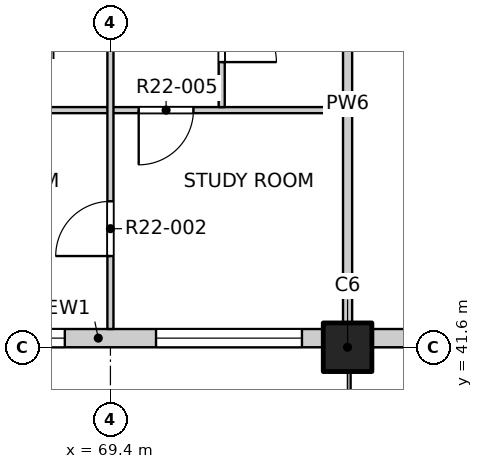
"""IFC4 building model, lengths in metres.
Left out: names, types, materials, properties, quantities, classifications, styles, units other than length and angle.
Written with IfcOpenShell. Run it as: python <this file> out.ifc"""

import sys

from ifc_helpers import new_model, si_unit, direction, frame, frame_2d, origin, origin_2d, place, context, subcontext, project, spatial, rectangle, extrude, element, fill, save


model = new_model("IFC4")
c1 = context("Model", 3, precision=1e-05, world=origin(), true_north=direction((0.0, 1.0)))
c2 = subcontext(c1, "Body", "Model", "MODEL_VIEW")
j1 = project(units=[si_unit("LENGTHUNIT", "METRE"), si_unit("PLANEANGLEUNIT", "RADIAN")], contexts=[c1])
p1 = place(None, origin())
s1 = spatial("IfcSite", under=j1, at=p1, CompositionType="ELEMENT")
p2 = place(p1, origin())
s2 = spatial("IfcBuilding", under=s1, at=p2, CompositionType="ELEMENT")
p3 = place(p2, frame((0.0, 0.0, 224.5)))
s3 = spatial("IfcBuildingStorey", under=s2, at=p3, CompositionType="ELEMENT", Elevation=224.5)
p4 = place(p3, frame((73.3, 41.6, -0.25), z_axis=(0.0, 0.0, 1.0), x_axis=(1.0, 0.0, 0.0)))
e1 = element("IfcColumn", 1, at=p4, inside=s3, PredefinedType="COLUMN", context=c2, shape_type="SweptSolid", body=[
    extrude(rectangle(XDim=0.8, YDim=0.8, at=origin_2d()), origin(), (0.0, 0.0, 1.0), 3.4),
])
p5 = place(p3, frame((65.5, 41.75, 0.0), z_axis=(0.0, 0.0, 1.0), x_axis=(1.0, 0.0, 0.0)))
e2 = element("IfcWall", 2, at=p5, inside=s3, PredefinedType="SOLIDWALL", context=c2, shape_type="SweptSolid", body=[
    extrude(rectangle(XDim=7.4, YDim=0.3, at=frame_2d((3.7, 0.0))), origin(), (0.0, 0.0, 1.0), 2.7),
])
p6 = place(p5, frame((0.75, 0.0, 0.9)))
e3 = element("IfcOpeningElement", 3, at=p6, cuts=e2, PredefinedType="OPENING", context=c2, shape_type="SweptSolid", body=[
    extrude(rectangle(XDim=2.4, YDim=1.8, at=frame_2d((1.2, 0.9))), frame((0.0, 0.16, 0.0), z_axis=(0.0, -1.0, 0.0), x_axis=(1.0, 0.0, 0.0)), (0.0, 0.0, 1.0), 0.32),
])
p7 = place(p5, frame((4.65, 0.0, 0.9)))
e4 = element("IfcOpeningElement", 4, at=p7, cuts=e2, PredefinedType="OPENING", context=c2, shape_type="SweptSolid", body=[
    extrude(rectangle(XDim=2.4, YDim=1.8, at=frame_2d((1.2, 0.9))), frame((0.0, 0.16, 0.0), z_axis=(0.0, -1.0, 0.0), x_axis=(1.0, 0.0, 0.0)), (0.0, 0.0, 1.0), 0.32),
])
p8 = place(p3, frame((73.7, 41.75, 0.0), z_axis=(0.0, 0.0, 1.0), x_axis=(1.0, 0.0, 0.0)))
e5 = element("IfcWall", 5, at=p8, inside=s3, PredefinedType="SOLIDWALL", context=c2, shape_type="SweptSolid", body=[
    extrude(rectangle(XDim=7.0, YDim=0.3, at=frame_2d((3.5, 0.0))), origin(), (0.0, 0.0, 1.0), 2.7),
])
p9 = place(p8, frame((0.65, 0.0, 0.0)))
e6 = element("IfcOpeningElement", 6, at=p9, cuts=e5, PredefinedType="OPENING", context=c2, shape_type="SweptSolid", body=[
    extrude(rectangle(XDim=1.8, YDim=2.4, at=frame_2d((0.9, 1.2))), frame((0.0, 0.16, 0.0), z_axis=(0.0, -1.0, 0.0), x_axis=(1.0, 0.0, 0.0)), (0.0, 0.0, 1.0), 0.32),
])
p10 = place(p8, frame((4.25, 0.0, 0.9)))
e7 = element("IfcOpeningElement", 7, at=p10, cuts=e5, PredefinedType="OPENING", context=c2, shape_type="SweptSolid", body=[
    extrude(rectangle(XDim=2.4, YDim=1.8, at=frame_2d((1.2, 0.9))), frame((0.0, 0.16, 0.0), z_axis=(0.0, -1.0, 0.0), x_axis=(1.0, 0.0, 0.0)), (0.0, 0.0, 1.0), 0.32),
])
p11 = place(p3, frame((61.9, 45.5, 0.0), z_axis=(0.0, 0.0, 1.0), x_axis=(1.0, 0.0, 0.0)))
e8 = element("IfcWall", 8, at=p11, inside=s3, PredefinedType="PARTITIONING", context=c2, shape_type="SweptSolid", body=[
    extrude(rectangle(XDim=11.475, YDim=0.1, at=frame_2d((5.737, 0.0))), origin(), (0.0, 0.0, 1.0), 3.15),
])
p12 = place(p11, frame((7.965, 0.0, 0.0)))
e9 = element("IfcOpeningElement", 9, at=p12, cuts=e8, PredefinedType="OPENING", context=c2, shape_type="SweptSolid", body=[
    extrude(rectangle(XDim=0.9, YDim=2.1, at=frame_2d((0.45, 1.05))), frame((0.0, 0.06, 0.0), z_axis=(0.0, -1.0, 0.0), x_axis=(1.0, 0.0, 0.0)), (0.0, 0.0, 1.0), 0.12),
])
p13 = place(p3, frame((69.4, 41.9, 0.0), z_axis=(0.0, 0.0, 1.0), x_axis=(0.0, 1.0, 0.0)))
e10 = element("IfcWall", 10, at=p13, inside=s3, PredefinedType="PARTITIONING", context=c2, shape_type="SweptSolid", body=[
    extrude(rectangle(XDim=46.2, YDim=0.1, at=frame_2d((23.1, 0.0))), origin(), (0.0, 0.0, 1.0), 3.15),
])
p14 = place(p13, frame((1.2, 0.0, 0.0)))
e11 = element("IfcOpeningElement", 11, at=p14, cuts=e10, PredefinedType="OPENING", context=c2, shape_type="SweptSolid", body=[
    extrude(rectangle(XDim=0.9, YDim=2.1, at=frame_2d((0.45, 1.05))), frame((0.0, 0.06, 0.0), z_axis=(0.0, -1.0, 0.0), x_axis=(1.0, 0.0, 0.0)), (0.0, 0.0, 1.0), 0.12),
])
p15 = place(p13, frame((5.1, 0.0, 0.0)))
e12 = element("IfcOpeningElement", 12, at=p15, cuts=e10, PredefinedType="OPENING", context=c2, shape_type="SweptSolid", body=[
    extrude(rectangle(XDim=0.9, YDim=2.1, at=frame_2d((0.45, 1.05))), frame((0.0, 0.06, 0.0), z_axis=(0.0, -1.0, 0.0), x_axis=(1.0, 0.0, 0.0)), (0.0, 0.0, 1.0), 0.12),
])
p16 = place(p13, frame((9.0, 0.0, 0.0)))
e13 = element("IfcOpeningElement", 13, at=p16, cuts=e10, PredefinedType="OPENING", context=c2, shape_type="SweptSolid", body=[
    extrude(rectangle(XDim=0.9, YDim=2.1, at=frame_2d((0.45, 1.05))), frame((0.0, 0.06, 0.0), z_axis=(0.0, -1.0, 0.0), x_axis=(1.0, 0.0, 0.0)), (0.0, 0.0, 1.0), 0.12),
])
p17 = place(p13, frame((13.85, 0.0, 0.0)))
e14 = element("IfcOpeningElement", 14, at=p17, cuts=e10, PredefinedType="OPENING", context=c2, shape_type="SweptSolid", body=[
    extrude(rectangle(XDim=0.9, YDim=2.1, at=frame_2d((0.45, 1.05))), frame((0.0, 0.06, 0.0), z_axis=(0.0, -1.0, 0.0), x_axis=(1.0, 0.0, 0.0)), (0.0, 0.0, 1.0), 0.12),
])
p18 = place(p13, frame((17.775, 0.0, 0.0)))
e15 = element("IfcOpeningElement", 15, at=p18, cuts=e10, PredefinedType="OPENING", context=c2, shape_type="SweptSolid", body=[
    extrude(rectangle(XDim=0.9, YDim=2.1, at=frame_2d((0.45, 1.05))), frame((0.0, 0.06, 0.0), z_axis=(0.0, -1.0, 0.0), x_axis=(1.0, 0.0, 0.0)), (0.0, 0.0, 1.0), 0.12),
])
p19 = place(p13, frame((21.625, 0.0, 0.0)))
e16 = element("IfcOpeningElement", 16, at=p19, cuts=e10, PredefinedType="OPENING", context=c2, shape_type="SweptSolid", body=[
    extrude(rectangle(XDim=0.9, YDim=2.1, at=frame_2d((0.45, 1.05))), frame((0.0, 0.06, 0.0), z_axis=(0.0, -1.0, 0.0), x_axis=(1.0, 0.0, 0.0)), (0.0, 0.0, 1.0), 0.12),
])
p20 = place(p13, frame((24.6, 0.0, 0.0)))
e17 = element("IfcOpeningElement", 17, at=p20, cuts=e10, PredefinedType="OPENING", context=c2, shape_type="SweptSolid", body=[
    extrude(rectangle(XDim=0.9, YDim=2.1, at=frame_2d((0.45, 1.05))), frame((0.0, 0.06, 0.0), z_axis=(0.0, -1.0, 0.0), x_axis=(1.0, 0.0, 0.0)), (0.0, 0.0, 1.0), 0.12),
])
p21 = place(p13, frame((29.425, 0.0, 0.0)))
e18 = element("IfcOpeningElement", 18, at=p21, cuts=e10, PredefinedType="OPENING", context=c2, shape_type="SweptSolid", body=[
    extrude(rectangle(XDim=0.9, YDim=2.1, at=frame_2d((0.45, 1.05))), frame((0.0, 0.06, 0.0), z_axis=(0.0, -1.0, 0.0), x_axis=(1.0, 0.0, 0.0)), (0.0, 0.0, 1.0), 0.12),
])
p22 = place(p13, frame((33.375, 0.0, 0.0)))
e19 = element("IfcOpeningElement", 19, at=p22, cuts=e10, PredefinedType="OPENING", context=c2, shape_type="SweptSolid", body=[
    extrude(rectangle(XDim=0.9, YDim=2.1, at=frame_2d((0.45, 1.05))), frame((0.0, 0.06, 0.0), z_axis=(0.0, -1.0, 0.0), x_axis=(1.0, 0.0, 0.0)), (0.0, 0.0, 1.0), 0.12),
])
p23 = place(p13, frame((36.3, 0.0, 0.0)))
e20 = element("IfcOpeningElement", 20, at=p23, cuts=e10, PredefinedType="OPENING", context=c2, shape_type="SweptSolid", body=[
    extrude(rectangle(XDim=0.9, YDim=2.1, at=frame_2d((0.45, 1.05))), frame((0.0, 0.06, 0.0), z_axis=(0.0, -1.0, 0.0), x_axis=(1.0, 0.0, 0.0)), (0.0, 0.0, 1.0), 0.12),
])
p24 = place(p13, frame((41.175, 0.0, 0.0)))
e21 = element("IfcOpeningElement", 21, at=p24, cuts=e10, PredefinedType="OPENING", context=c2, shape_type="SweptSolid", body=[
    extrude(rectangle(XDim=0.9, YDim=2.1, at=frame_2d((0.45, 1.05))), frame((0.0, 0.06, 0.0), z_axis=(0.0, -1.0, 0.0), x_axis=(1.0, 0.0, 0.0)), (0.0, 0.0, 1.0), 0.12),
])
p25 = place(p13, frame((44.1, 0.0, 0.0)))
e22 = element("IfcOpeningElement", 22, at=p25, cuts=e10, PredefinedType="OPENING", context=c2, shape_type="SweptSolid", body=[
    extrude(rectangle(XDim=0.9, YDim=2.1, at=frame_2d((0.45, 1.05))), frame((0.0, 0.06, 0.0), z_axis=(0.0, -1.0, 0.0), x_axis=(1.0, 0.0, 0.0)), (0.0, 0.0, 1.0), 0.12),
])
p26 = place(p3, frame((71.23, 45.55, 0.0), z_axis=(0.0, 0.0, 1.0), x_axis=(0.0, 1.0, 0.0)))
e23 = element("IfcWall", 23, at=p26, inside=s3, PredefinedType="PARTITIONING", context=c2, shape_type="SweptSolid", body=[
    extrude(rectangle(XDim=8.65, YDim=0.1, at=frame_2d((4.325, 0.0))), origin(), (0.0, 0.0, 1.0), 3.15),
])
p27 = place(p26, frame((0.74, 0.0, 0.0)))
e24 = element("IfcOpeningElement", 24, at=p27, cuts=e23, PredefinedType="OPENING", context=c2, shape_type="SweptSolid", body=[
    extrude(rectangle(XDim=0.9, YDim=2.1, at=frame_2d((0.45, 1.05))), frame((0.0, 0.06, 0.0), z_axis=(0.0, -1.0, 0.0), x_axis=(1.0, 0.0, 0.0)), (0.0, 0.0, 1.0), 0.12),
])
p28 = place(p26, frame((3.48, 0.0, 0.0)))
e25 = element("IfcOpeningElement", 25, at=p28, cuts=e23, PredefinedType="OPENING", context=c2, shape_type="SweptSolid", body=[
    extrude(rectangle(XDim=0.8, YDim=2.1, at=frame_2d((0.4, 1.05))), frame((0.0, 0.06, 0.0), z_axis=(0.0, -1.0, 0.0), x_axis=(1.0, 0.0, 0.0)), (0.0, 0.0, 1.0), 0.12),
])
p29 = place(p26, frame((6.565, 0.0, 0.0)))
e26 = element("IfcOpeningElement", 26, at=p29, cuts=e23, PredefinedType="OPENING", context=c2, shape_type="SweptSolid", body=[
    extrude(rectangle(XDim=0.9, YDim=2.1, at=frame_2d((0.45, 1.05))), frame((0.0, 0.06, 0.0), z_axis=(0.0, -1.0, 0.0), x_axis=(1.0, 0.0, 0.0)), (0.0, 0.0, 1.0), 0.12),
])
p30 = place(p3, frame((73.3, 41.9, 0.0), z_axis=(0.0, 0.0, 1.0), x_axis=(0.0, 1.0, 0.0)))
e27 = element("IfcWall", 27, at=p30, inside=s3, PredefinedType="PARTITIONING", context=c2, shape_type="SweptSolid", body=[
    extrude(rectangle(XDim=7.4, YDim=0.15, at=frame_2d((3.7, 0.0))), origin(), (0.0, 0.0, 1.0), 3.15),
])
p31 = place(p6, origin())
e28 = element("IfcWindow", 28, at=p31, inside=s3, PartitioningType="DOUBLE_PANEL_VERTICAL", PredefinedType="WINDOW", context=c2, shape_type="SweptSolid", body=[
    extrude(rectangle(XDim=2.4, YDim=1.8, at=frame_2d((1.2, 0.9))), frame((0.0, 0.03, 0.0), z_axis=(0.0, -1.0, 0.0), x_axis=(1.0, 0.0, 0.0)), (0.0, 0.0, 1.0), 0.06),
])
fill(e3, e28)
p32 = place(p7, origin())
e29 = element("IfcWindow", 29, at=p32, inside=s3, PartitioningType="DOUBLE_PANEL_VERTICAL", PredefinedType="WINDOW", context=c2, shape_type="SweptSolid", body=[
    extrude(rectangle(XDim=2.4, YDim=1.8, at=frame_2d((1.2, 0.9))), frame((0.0, 0.03, 0.0), z_axis=(0.0, -1.0, 0.0), x_axis=(1.0, 0.0, 0.0)), (0.0, 0.0, 1.0), 0.06),
])
fill(e4, e29)
p33 = place(p14, origin())
e30 = element("IfcDoor", 30, at=p33, inside=s3, OperationType="SINGLE_SWING_LEFT", PredefinedType="DOOR", context=c2, shape_type="SweptSolid", body=[
    extrude(rectangle(XDim=0.9, YDim=2.1, at=frame_2d((0.45, 1.05))), frame((0.0, 0.025, 0.0), z_axis=(0.0, -1.0, 0.0), x_axis=(1.0, 0.0, 0.0)), (0.0, 0.0, 1.0), 0.05),
])
fill(e11, e30)
p34 = place(p12, origin())
e31 = element("IfcDoor", 31, at=p34, inside=s3, OperationType="SINGLE_SWING_RIGHT", PredefinedType="DOOR", context=c2, shape_type="SweptSolid", body=[
    extrude(rectangle(XDim=0.9, YDim=2.1, at=frame_2d((0.45, 1.05))), frame((0.0, 0.025, 0.0), z_axis=(0.0, -1.0, 0.0), x_axis=(1.0, 0.0, 0.0)), (0.0, 0.0, 1.0), 0.05),
])
fill(e9, e31)
p35 = place(p27, origin())
e32 = element("IfcDoor", 32, at=p35, inside=s3, OperationType="SINGLE_SWING_RIGHT", PredefinedType="DOOR", context=c2, shape_type="SweptSolid", body=[
    extrude(rectangle(XDim=0.9, YDim=2.1, at=frame_2d((0.45, 1.05))), frame((0.0, 0.025, 0.0), z_axis=(0.0, -1.0, 0.0), x_axis=(1.0, 0.0, 0.0)), (0.0, 0.0, 1.0), 0.05),
])
fill(e24, e32)
save(model, sys.argv[1])
